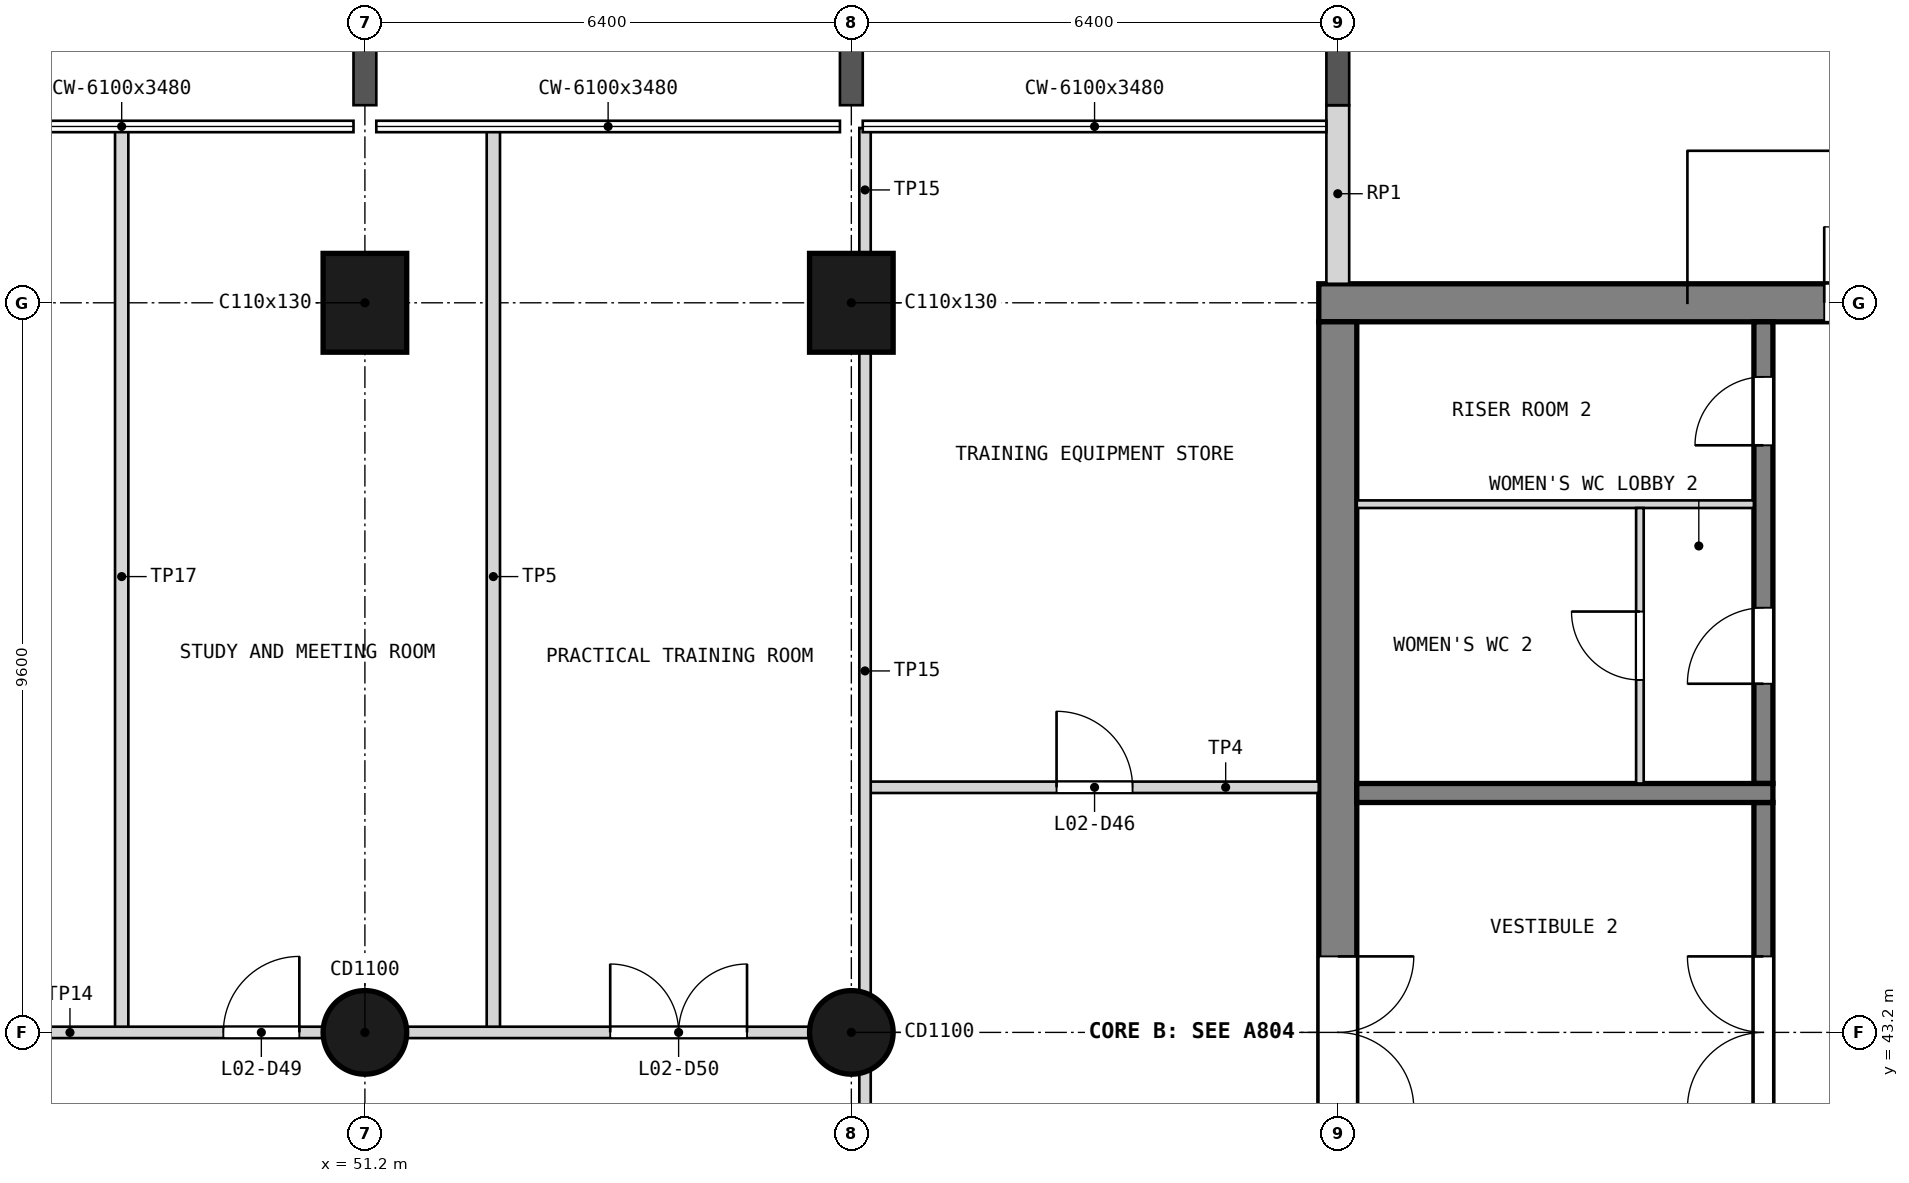
"""IFC4 building model, lengths in metres.
Left out: names, types, materials, properties, quantities, classifications, styles, units other than length and angle.
Written with IfcOpenShell. Run it as: python <this file> out.ifc"""

import sys

from ifc_helpers import new_model, si_unit, direction, frame, frame_2d, origin, origin_2d, place, context, subcontext, project, spatial, rectangle, circle, extrude, element, fill, save


model = new_model("IFC4")
c1 = context("Model", 3, precision=1e-05, world=origin(), true_north=direction((0.0, 1.0)))
c2 = subcontext(c1, "Body", "Model", "MODEL_VIEW")
j1 = project(units=[si_unit("LENGTHUNIT", "METRE"), si_unit("PLANEANGLEUNIT", "RADIAN")], contexts=[c1])
p1 = place(None, origin())
s1 = spatial("IfcSite", under=j1, at=p1, CompositionType="ELEMENT")
p2 = place(p1, origin())
s2 = spatial("IfcBuilding", under=s1, at=p2, CompositionType="ELEMENT")
p3 = place(p2, frame((0.0, 0.0, 8.4)))
s3 = spatial("IfcBuildingStorey", under=s2, at=p3, CompositionType="ELEMENT", Elevation=8.4)
p4 = place(p3, frame((63.75, 52.8, 0.0), z_axis=(0.0, 0.0, 1.0), x_axis=(1.0, 0.0, 0.0)))
e1 = element("IfcWall", 1, at=p4, inside=s3, PredefinedType="SHEAR", context=c2, shape_type="SweptSolid", body=[
    extrude(rectangle(XDim=13.3, YDim=0.5, at=frame_2d((6.65, 0.0))), origin(), (0.0, 0.0, 1.0), 4.5),
])
p5 = place(p4, frame((11.05, 0.0, 1.0)))
e2 = element("IfcOpeningElement", 2, at=p5, cuts=e1, PredefinedType="OPENING", context=c2, shape_type="SweptSolid", body=[
    extrude(rectangle(XDim=0.4, YDim=2.0, at=frame_2d((0.2, 1.0))), frame((0.0, 0.26, 0.0), z_axis=(0.0, -1.0, 0.0), x_axis=(1.0, 0.0, 0.0)), (0.0, 0.0, 1.0), 0.52),
])
p6 = place(p4, frame((6.65, 0.0, 0.0)))
e3 = element("IfcOpeningElement", 3, at=p6, cuts=e1, PredefinedType="OPENING", context=c2, shape_type="SweptSolid", body=[
    extrude(rectangle(XDim=2.0, YDim=2.1, at=frame_2d((1.0, 1.05))), frame((0.0, 0.26, 0.0), z_axis=(0.0, -1.0, 0.0), x_axis=(1.0, 0.0, 0.0)), (0.0, 0.0, 1.0), 0.52),
])
p7 = place(p3, frame((64.0, 33.85, 0.0), z_axis=(0.0, 0.0, 1.0), x_axis=(0.0, 1.0, 0.0)))
e4 = element("IfcWall", 4, at=p7, inside=s3, PredefinedType="SHEAR", context=c2, shape_type="SweptSolid", body=[
    extrude(rectangle(XDim=18.7, YDim=0.5, at=frame_2d((9.35, 0.0))), origin(), (0.0, 0.0, 1.0), 4.5),
])
p8 = place(p7, frame((8.35, 0.0, 0.0)))
e5 = element("IfcOpeningElement", 5, at=p8, cuts=e4, PredefinedType="OPENING", context=c2, shape_type="SweptSolid", body=[
    extrude(rectangle(XDim=2.0, YDim=2.1, at=frame_2d((1.0, 1.05))), frame((0.0, 0.26, 0.0), z_axis=(0.0, -1.0, 0.0), x_axis=(1.0, 0.0, 0.0)), (0.0, 0.0, 1.0), 0.52),
])
p9 = place(p3, frame((51.2, 43.2, 0.0), z_axis=(0.0, 0.0, 1.0), x_axis=(1.0, 0.0, 0.0)))
e6 = element("IfcColumn", 6, at=p9, inside=s3, PredefinedType="COLUMN", context=c2, shape_type="SweptSolid", body=[
    extrude(circle(Radius=0.55, at=origin_2d()), origin(), (0.0, 0.0, 1.0), 4.5),
])
p10 = place(p3, frame((51.2, 52.8, 0.0), z_axis=(0.0, 0.0, 1.0), x_axis=(1.0, 0.0, 0.0)))
e7 = element("IfcColumn", 7, at=p10, inside=s3, PredefinedType="COLUMN", context=c2, shape_type="SweptSolid", body=[
    extrude(rectangle(XDim=1.1, YDim=1.3, at=origin_2d()), origin(), (0.0, 0.0, 1.0), 4.5),
])
p11 = place(p3, frame((57.6, 43.2, 0.0), z_axis=(0.0, 0.0, 1.0), x_axis=(1.0, 0.0, 0.0)))
e8 = element("IfcColumn", 8, at=p11, inside=s3, PredefinedType="COLUMN", context=c2, shape_type="SweptSolid", body=[
    extrude(circle(Radius=0.55, at=origin_2d()), origin(), (0.0, 0.0, 1.0), 4.5),
])
p12 = place(p3, frame((57.6, 52.8, 0.0), z_axis=(0.0, 0.0, 1.0), x_axis=(1.0, 0.0, 0.0)))
e9 = element("IfcColumn", 9, at=p12, inside=s3, PredefinedType="COLUMN", context=c2, shape_type="SweptSolid", body=[
    extrude(rectangle(XDim=1.1, YDim=1.3, at=origin_2d()), origin(), (0.0, 0.0, 1.0), 4.5),
])
p13 = place(p3, frame((64.0, 53.05, 0.0), z_axis=(0.0, 0.0, 1.0), x_axis=(0.0, 1.0, 0.0)))
e10 = element("IfcWall", 10, at=p13, inside=s3, PredefinedType="SOLIDWALL", context=c2, shape_type="SweptSolid", body=[
    extrude(rectangle(XDim=2.35, YDim=0.3, at=frame_2d((1.175, 0.0))), origin(), (0.0, 0.0, 1.0), 3.48),
])
p14 = place(p3, frame((69.6, 40.175, 0.0), z_axis=(0.0, 0.0, 1.0), x_axis=(0.0, 1.0, 0.0)))
e11 = element("IfcWall", 11, at=p14, inside=s3, PredefinedType="SOLIDWALL", context=c2, shape_type="SweptSolid", body=[
    extrude(rectangle(XDim=6.05, YDim=0.25, at=frame_2d((3.025, 0.0))), origin(), (0.0, 0.0, 1.0), 4.2),
])
p15 = place(p14, frame((2.025, 0.0, 0.0)))
e12 = element("IfcOpeningElement", 12, at=p15, cuts=e11, PredefinedType="OPENING", context=c2, shape_type="SweptSolid", body=[
    extrude(rectangle(XDim=2.0, YDim=2.1, at=frame_2d((1.0, 1.05))), frame((0.0, 0.135, 0.0), z_axis=(0.0, -1.0, 0.0), x_axis=(1.0, 0.0, 0.0)), (0.0, 0.0, 1.0), 0.27),
])
p16 = place(p3, frame((69.6, 46.475, 0.0), z_axis=(0.0, 0.0, 1.0), x_axis=(0.0, 1.0, 0.0)))
e13 = element("IfcWall", 13, at=p16, inside=s3, PredefinedType="SOLIDWALL", context=c2, shape_type="SweptSolid", body=[
    extrude(rectangle(XDim=6.075, YDim=0.25, at=frame_2d((3.038, 0.0))), origin(), (0.0, 0.0, 1.0), 4.2),
])
p17 = place(p16, frame((1.312, 0.0, 0.0)))
e14 = element("IfcOpeningElement", 14, at=p17, cuts=e13, PredefinedType="OPENING", context=c2, shape_type="SweptSolid", body=[
    extrude(rectangle(XDim=1.0, YDim=2.1, at=frame_2d((0.5, 1.05))), frame((0.0, 0.135, 0.0), z_axis=(0.0, -1.0, 0.0), x_axis=(1.0, 0.0, 0.0)), (0.0, 0.0, 1.0), 0.27),
])
p18 = place(p16, frame((4.45, 0.0, 0.0)))
e15 = element("IfcOpeningElement", 15, at=p18, cuts=e13, PredefinedType="OPENING", context=c2, shape_type="SweptSolid", body=[
    extrude(rectangle(XDim=0.9, YDim=2.1, at=frame_2d((0.45, 1.05))), frame((0.0, 0.135, 0.0), z_axis=(0.0, -1.0, 0.0), x_axis=(1.0, 0.0, 0.0)), (0.0, 0.0, 1.0), 0.27),
])
p19 = place(p3, frame((69.725, 46.35, 0.0), z_axis=(0.0, 0.0, 1.0), x_axis=(-1.0, 0.0, 0.0)))
e16 = element("IfcWall", 16, at=p19, inside=s3, PredefinedType="SOLIDWALL", context=c2, shape_type="SweptSolid", body=[
    extrude(rectangle(XDim=5.475, YDim=0.25, at=frame_2d((2.738, 0.0))), origin(), (0.0, 0.0, 1.0), 4.2),
])
p20 = place(p3, frame((69.475, 50.15, 0.0), z_axis=(0.0, 0.0, 1.0), x_axis=(-1.0, 0.0, 0.0)))
e17 = element("IfcWall", 17, at=p20, inside=s3, PredefinedType="PARTITIONING", context=c2, shape_type="SweptSolid", body=[
    extrude(rectangle(XDim=5.225, YDim=0.1, at=frame_2d((2.613, 0.0))), origin(), (0.0, 0.0, 1.0), 4.2),
])
p21 = place(p3, frame((67.975, 46.475, 0.0), z_axis=(0.0, 0.0, 1.0), x_axis=(0.0, 1.0, 0.0)))
e18 = element("IfcWall", 18, at=p21, inside=s3, PredefinedType="PARTITIONING", context=c2, shape_type="SweptSolid", body=[
    extrude(rectangle(XDim=3.625, YDim=0.1, at=frame_2d((1.812, 0.0))), origin(), (0.0, 0.0, 1.0), 4.2),
])
p22 = place(p21, frame((1.363, 0.0, 0.0)))
e19 = element("IfcOpeningElement", 19, at=p22, cuts=e18, PredefinedType="OPENING", context=c2, shape_type="SweptSolid", body=[
    extrude(rectangle(XDim=0.9, YDim=2.1, at=frame_2d((0.45, 1.05))), frame((0.0, 0.06, 0.0), z_axis=(0.0, -1.0, 0.0), x_axis=(1.0, 0.0, 0.0)), (0.0, 0.0, 1.0), 0.12),
])
p23 = place(p3, frame((48.0, 43.2, 0.0), z_axis=(0.0, 0.0, 1.0), x_axis=(0.0, 1.0, 0.0)))
e20 = element("IfcWall", 20, at=p23, inside=s3, PredefinedType="PARTITIONING", context=c2, shape_type="SweptSolid", body=[
    extrude(rectangle(XDim=11.9, YDim=0.175, at=frame_2d((5.95, 0.0))), origin(), (0.0, 0.0, 1.0), 3.68),
])
p24 = place(p3, frame((52.89, 43.2, 0.0), z_axis=(0.0, 0.0, 1.0), x_axis=(0.0, 1.0, 0.0)))
e21 = element("IfcWall", 21, at=p24, inside=s3, PredefinedType="PARTITIONING", context=c2, shape_type="SweptSolid", body=[
    extrude(rectangle(XDim=11.9, YDim=0.175, at=frame_2d((5.95, 0.0))), origin(), (0.0, 0.0, 1.0), 4.28),
])
p25 = place(p3, frame((31.82, 43.2, 0.0), z_axis=(0.0, 0.0, 1.0), x_axis=(1.0, 0.0, 0.0)))
e22 = element("IfcWall", 22, at=p25, inside=s3, PredefinedType="PARTITIONING", context=c2, shape_type="SweptSolid", body=[
    extrude(rectangle(XDim=25.96, YDim=0.15, at=frame_2d((12.98, 0.0))), origin(), (0.0, 0.0, 1.0), 3.48),
])
p26 = place(p25, frame((3.175, 0.0, 0.0)))
e23 = element("IfcOpeningElement", 23, at=p26, cuts=e22, PredefinedType="OPENING", context=c2, shape_type="SweptSolid", body=[
    extrude(rectangle(XDim=1.8, YDim=2.1, at=frame_2d((0.9, 1.05))), frame((0.0, 0.085, 0.0), z_axis=(0.0, -1.0, 0.0), x_axis=(1.0, 0.0, 0.0)), (0.0, 0.0, 1.0), 0.17),
])
p27 = place(p25, frame((10.325, 0.0, 0.0)))
e24 = element("IfcOpeningElement", 24, at=p27, cuts=e22, PredefinedType="OPENING", context=c2, shape_type="SweptSolid", body=[
    extrude(rectangle(XDim=1.8, YDim=2.1, at=frame_2d((0.9, 1.05))), frame((0.0, 0.085, 0.0), z_axis=(0.0, -1.0, 0.0), x_axis=(1.0, 0.0, 0.0)), (0.0, 0.0, 1.0), 0.17),
])
p28 = place(p25, frame((17.518, 0.0, 0.0)))
e25 = element("IfcOpeningElement", 25, at=p28, cuts=e22, PredefinedType="OPENING", context=c2, shape_type="SweptSolid", body=[
    extrude(rectangle(XDim=1.0, YDim=2.1, at=frame_2d((0.5, 1.05))), frame((0.0, 0.085, 0.0), z_axis=(0.0, -1.0, 0.0), x_axis=(1.0, 0.0, 0.0)), (0.0, 0.0, 1.0), 0.17),
])
p29 = place(p25, frame((22.607, 0.0, 0.0)))
e26 = element("IfcOpeningElement", 26, at=p29, cuts=e22, PredefinedType="OPENING", context=c2, shape_type="SweptSolid", body=[
    extrude(rectangle(XDim=1.8, YDim=2.1, at=frame_2d((0.9, 1.05))), frame((0.0, 0.085, 0.0), z_axis=(0.0, -1.0, 0.0), x_axis=(1.0, 0.0, 0.0)), (0.0, 0.0, 1.0), 0.17),
])
p30 = place(p3, frame((57.78, 46.425, 0.0), z_axis=(0.0, 0.0, 1.0), x_axis=(1.0, 0.0, 0.0)))
e27 = element("IfcWall", 27, at=p30, inside=s3, PredefinedType="PARTITIONING", context=c2, shape_type="SweptSolid", body=[
    extrude(rectangle(XDim=5.97, YDim=0.15, at=frame_2d((2.985, 0.0))), origin(), (0.0, 0.0, 1.0), 4.28),
])
p31 = place(p30, frame((2.52, 0.0, 0.0)))
e28 = element("IfcOpeningElement", 28, at=p31, cuts=e27, PredefinedType="OPENING", context=c2, shape_type="SweptSolid", body=[
    extrude(rectangle(XDim=1.0, YDim=2.1, at=frame_2d((0.5, 1.05))), frame((0.0, 0.085, 0.0), z_axis=(0.0, -1.0, 0.0), x_axis=(1.0, 0.0, 0.0)), (0.0, 0.0, 1.0), 0.17),
])
p32 = place(p3, frame((57.78, 39.375, 0.0), z_axis=(0.0, 0.0, 1.0), x_axis=(0.0, 1.0, 0.0)))
e29 = element("IfcWall", 29, at=p32, inside=s3, PredefinedType="PARTITIONING", context=c2, shape_type="SweptSolid", body=[
    extrude(rectangle(XDim=3.325, YDim=0.15, at=frame_2d((1.663, 0.0))), origin(), (0.0, 0.0, 1.0), 3.38),
])
p33 = place(p3, frame((57.78, 43.7, 0.0), z_axis=(0.0, 0.0, 1.0), x_axis=(0.0, 1.0, 0.0)))
e30 = element("IfcWall", 30, at=p33, inside=s3, PredefinedType="PARTITIONING", context=c2, shape_type="SweptSolid", body=[
    extrude(rectangle(XDim=8.47, YDim=0.15, at=frame_2d((4.235, 0.0))), origin(), (0.0, 0.0, 1.0), 3.38),
])
p34 = place(p3, frame((57.78, 53.43, 0.0), z_axis=(0.0, 0.0, 1.0), x_axis=(0.0, 1.0, 0.0)))
e31 = element("IfcWall", 31, at=p34, inside=s3, PredefinedType="PARTITIONING", context=c2, shape_type="SweptSolid", body=[
    extrude(rectangle(XDim=1.67, YDim=0.15, at=frame_2d((0.835, 0.0))), origin(), (0.0, 0.0, 1.0), 3.38),
])
p35 = place(p15, origin())
e32 = element("IfcDoor", 32, at=p35, inside=s3, OperationType="DOUBLE_DOOR_SINGLE_SWING", PredefinedType="DOOR", context=c2, shape_type="SweptSolid", body=[
    extrude(rectangle(XDim=2.0, YDim=2.1, at=frame_2d((1.0, 1.05))), frame((0.0, 0.025, 0.0), z_axis=(0.0, -1.0, 0.0), x_axis=(1.0, 0.0, 0.0)), (0.0, 0.0, 1.0), 0.05),
])
fill(e12, e32)
p36 = place(p8, frame((2.0, 0.0, 0.0), z_axis=(0.0, 0.0, 1.0), x_axis=(-1.0, 0.0, 0.0)))
e33 = element("IfcDoor", 33, at=p36, inside=s3, OperationType="DOUBLE_DOOR_SINGLE_SWING", PredefinedType="DOOR", context=c2, shape_type="SweptSolid", body=[
    extrude(rectangle(XDim=2.0, YDim=2.1, at=frame_2d((1.0, 1.05))), frame((0.0, 0.025, 0.0), z_axis=(0.0, -1.0, 0.0), x_axis=(1.0, 0.0, 0.0)), (0.0, 0.0, 1.0), 0.05),
])
fill(e5, e33)
p37 = place(p17, origin())
e34 = element("IfcDoor", 34, at=p37, inside=s3, OperationType="SINGLE_SWING_LEFT", PredefinedType="DOOR", context=c2, shape_type="SweptSolid", body=[
    extrude(rectangle(XDim=1.0, YDim=2.1, at=frame_2d((0.5, 1.05))), frame((0.0, 0.025, 0.0), z_axis=(0.0, -1.0, 0.0), x_axis=(1.0, 0.0, 0.0)), (0.0, 0.0, 1.0), 0.05),
])
fill(e14, e34)
p38 = place(p22, origin())
e35 = element("IfcDoor", 35, at=p38, inside=s3, OperationType="SINGLE_SWING_RIGHT", PredefinedType="DOOR", context=c2, shape_type="SweptSolid", body=[
    extrude(rectangle(XDim=0.9, YDim=2.1, at=frame_2d((0.45, 1.05))), frame((0.0, 0.025, 0.0), z_axis=(0.0, -1.0, 0.0), x_axis=(1.0, 0.0, 0.0)), (0.0, 0.0, 1.0), 0.05),
])
fill(e19, e35)
p39 = place(p18, origin())
e36 = element("IfcDoor", 36, at=p39, inside=s3, OperationType="SINGLE_SWING_LEFT", PredefinedType="DOOR", context=c2, shape_type="SweptSolid", body=[
    extrude(rectangle(XDim=0.9, YDim=2.1, at=frame_2d((0.45, 1.05))), frame((0.0, 0.025, 0.0), z_axis=(0.0, -1.0, 0.0), x_axis=(1.0, 0.0, 0.0)), (0.0, 0.0, 1.0), 0.05),
])
fill(e15, e36)
p40 = place(p6, origin())
e37 = element("IfcDoor", 37, at=p40, inside=s3, OperationType="DOUBLE_DOOR_SINGLE_SWING", PredefinedType="DOOR", context=c2, shape_type="SweptSolid", body=[
    extrude(rectangle(XDim=2.0, YDim=2.1, at=frame_2d((1.0, 1.05))), frame((0.0, 0.025, 0.0), z_axis=(0.0, -1.0, 0.0), x_axis=(1.0, 0.0, 0.0)), (0.0, 0.0, 1.0), 0.05),
])
fill(e3, e37)
p41 = place(p31, origin())
e38 = element("IfcDoor", 38, at=p41, inside=s3, OperationType="SINGLE_SWING_LEFT", PredefinedType="DOOR", context=c2, shape_type="SweptSolid", body=[
    extrude(rectangle(XDim=1.0, YDim=2.1, at=frame_2d((0.5, 1.05))), frame((0.0, 0.025, 0.0), z_axis=(0.0, -1.0, 0.0), x_axis=(1.0, 0.0, 0.0)), (0.0, 0.0, 1.0), 0.05),
])
fill(e28, e38)
p42 = place(p28, origin())
e39 = element("IfcDoor", 39, at=p42, inside=s3, OperationType="SINGLE_SWING_RIGHT", PredefinedType="DOOR", context=c2, shape_type="SweptSolid", body=[
    extrude(rectangle(XDim=1.0, YDim=2.1, at=frame_2d((0.5, 1.05))), frame((0.0, 0.025, 0.0), z_axis=(0.0, -1.0, 0.0), x_axis=(1.0, 0.0, 0.0)), (0.0, 0.0, 1.0), 0.05),
])
fill(e25, e39)
p43 = place(p29, origin())
e40 = element("IfcDoor", 40, at=p43, inside=s3, OperationType="DOUBLE_DOOR_SINGLE_SWING", PredefinedType="DOOR", context=c2, shape_type="SweptSolid", body=[
    extrude(rectangle(XDim=1.8, YDim=2.1, at=frame_2d((0.9, 1.05))), frame((0.0, 0.025, 0.0), z_axis=(0.0, -1.0, 0.0), x_axis=(1.0, 0.0, 0.0)), (0.0, 0.0, 1.0), 0.05),
])
fill(e26, e40)
save(model, sys.argv[1])
